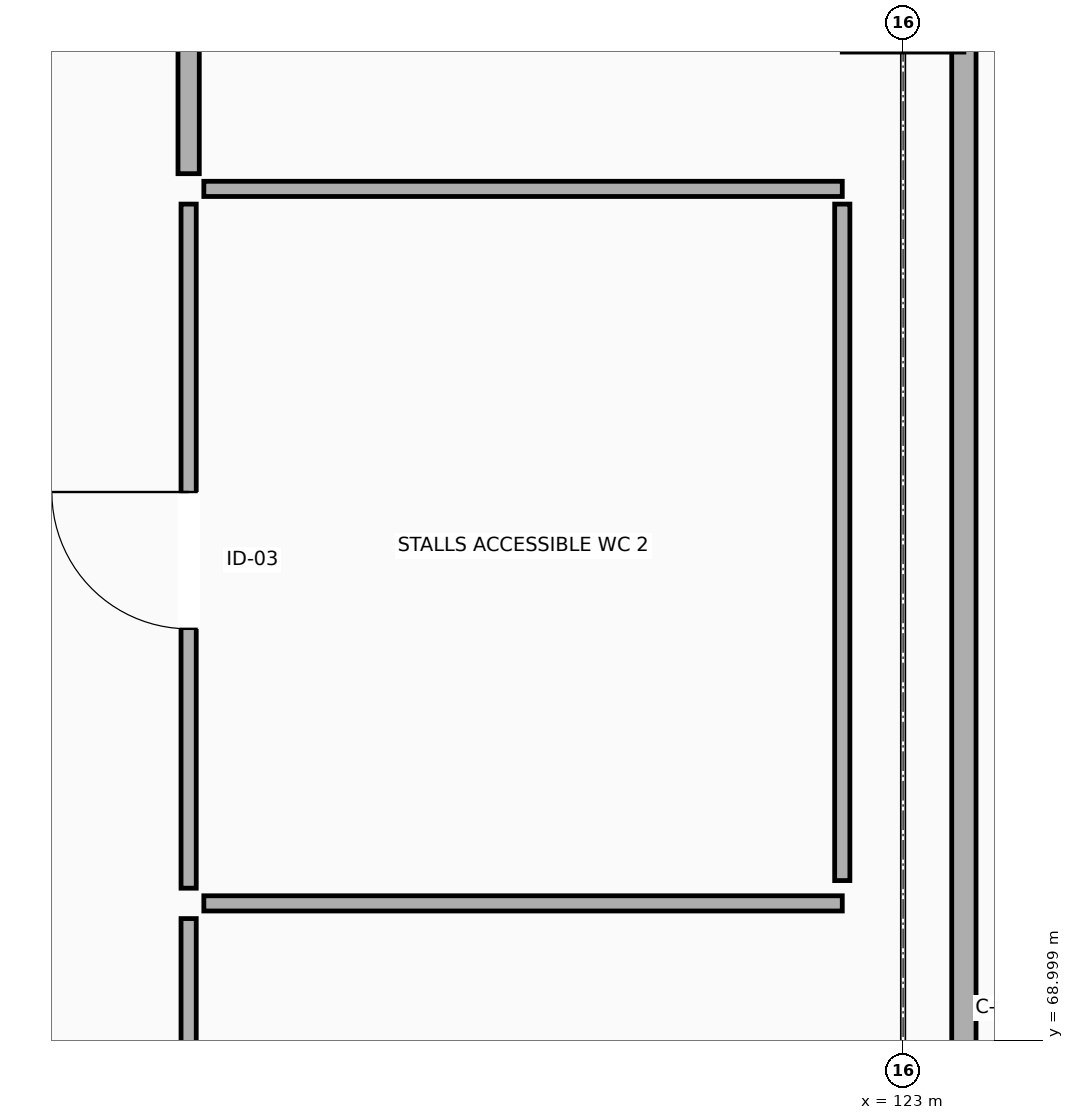
"""IFC4 building model, lengths in metres.
Left out: names, types, materials, properties, quantities, classifications, styles, units other than length and angle.
Written with IfcOpenShell. Run it as: python <this file> out.ifc"""

import sys

from ifc_helpers import new_model, si_unit, direction, frame, frame_2d, origin, origin_2d, place, context, subcontext, project, spatial, rectangle, extrude, element, fill, save


model = new_model("IFC4")
c1 = context("Model", 3, precision=1e-05, world=origin(), true_north=direction((0.0, 1.0)))
c2 = subcontext(c1, "Body", "Model", "MODEL_VIEW")
j1 = project(units=[si_unit("LENGTHUNIT", "METRE"), si_unit("PLANEANGLEUNIT", "RADIAN")], contexts=[c1])
p1 = place(None, origin())
s1 = spatial("IfcSite", under=j1, at=p1, CompositionType="ELEMENT")
p2 = place(p1, origin())
s2 = spatial("IfcBuilding", under=s1, at=p2, CompositionType="ELEMENT")
p3 = place(p2, origin())
s3 = spatial("IfcBuildingStorey", under=s2, at=p3, CompositionType="ELEMENT", Elevation=0.0)
p4 = place(p3, frame((123.0, 75.9, 0.0), z_axis=(0.0, 0.0, 1.0), x_axis=(1.0, 0.0, 0.0)))
e1 = element("IfcColumn", 1, at=p4, inside=s3, PredefinedType="COLUMN", context=c2, shape_type="SweptSolid", body=[
    extrude(rectangle(XDim=0.8, YDim=0.8, at=origin_2d()), origin(), (0.0, 0.0, 1.0), 5.4),
])
p5 = place(p3, frame((118.3, 65.3, 0.0), z_axis=(0.0, 0.0, 1.0), x_axis=(0.0, 1.0, 0.0)))
e2 = element("IfcWall", 2, at=p5, inside=s3, PredefinedType="PARTITIONING", context=c2, shape_type="SweptSolid", body=[
    extrude(rectangle(XDim=4.5, YDim=0.1, at=frame_2d((2.25, 0.0))), origin(), (0.0, 0.0, 1.0), 4.137),
])
p6 = place(p5, frame((0.58, 0.0, 0.0)))
e3 = element("IfcOpeningElement", 3, at=p6, cuts=e2, PredefinedType="OPENING", context=c2, shape_type="SweptSolid", body=[
    extrude(rectangle(XDim=0.9, YDim=2.1, at=frame_2d((0.45, 1.05))), frame((0.0, 0.06, 0.0), z_axis=(0.0, -1.0, 0.0), x_axis=(1.0, 0.0, 0.0)), (0.0, 0.0, 1.0), 0.12),
])
p7 = place(p3, frame((118.3, 70.0, 0.0), z_axis=(0.0, 0.0, 1.0), x_axis=(0.0, 1.0, 0.0)))
e4 = element("IfcWall", 4, at=p7, inside=s3, PredefinedType="PARTITIONING", context=c2, shape_type="SweptSolid", body=[
    extrude(rectangle(XDim=4.5, YDim=0.1, at=frame_2d((2.25, 0.0))), origin(), (0.0, 0.0, 1.0), 5.085),
])
p8 = place(p7, frame((1.706, 0.0, 0.0)))
e5 = element("IfcOpeningElement", 5, at=p8, cuts=e4, PredefinedType="OPENING", context=c2, shape_type="SweptSolid", body=[
    extrude(rectangle(XDim=0.9, YDim=2.1, at=frame_2d((0.45, 1.05))), frame((0.0, 0.06, 0.0), z_axis=(0.0, -1.0, 0.0), x_axis=(1.0, 0.0, 0.0)), (0.0, 0.0, 1.0), 0.12),
])
p9 = place(p3, frame((118.3, 74.7, 0.0), z_axis=(0.0, 0.0, 1.0), x_axis=(0.0, 1.0, 0.0)))
e6 = element("IfcWall", 6, at=p9, inside=s3, PredefinedType="PARTITIONING", context=c2, shape_type="SweptSolid", body=[
    extrude(rectangle(XDim=4.3, YDim=0.14, at=frame_2d((2.15, 0.0))), origin(), (0.0, 0.0, 1.0), 4.137),
])
p10 = place(p9, frame((2.27, 0.0, 0.0)))
e7 = element("IfcOpeningElement", 7, at=p10, cuts=e6, PredefinedType="OPENING", context=c2, shape_type="SweptSolid", body=[
    extrude(rectangle(XDim=1.45, YDim=2.3, at=frame_2d((0.725, 1.15))), frame((0.0, 0.08, 0.0), z_axis=(0.0, -1.0, 0.0), x_axis=(1.0, 0.0, 0.0)), (0.0, 0.0, 1.0), 0.16),
])
for number, where, z_axis, x_axis in (
    (8, (118.4, 69.9, 0.0), (0.0, 0.0, 1.0), (1.0, 0.0, 0.0)),
    (9, (118.4, 74.6, 0.0), (0.0, 0.0, 1.0), (1.0, 0.0, 0.0)),
):
    element("IfcWall", number, at=place(p3, frame(where, z_axis=z_axis, x_axis=x_axis)), inside=s3, PredefinedType="PARTITIONING", context=c2, shape_type="SweptSolid", body=[
        extrude(rectangle(XDim=4.2, YDim=0.1, at=frame_2d((2.1, 0.0))), origin(), (0.0, 0.0, 1.0), 4.727),
    ])
p11 = place(p3, frame((122.6, 70.05, 0.0), z_axis=(0.0, 0.0, 1.0), x_axis=(0.0, 1.0, 0.0)))
e10 = element("IfcWall", 10, at=p11, inside=s3, PredefinedType="PARTITIONING", context=c2, shape_type="SweptSolid", body=[
    extrude(rectangle(XDim=4.45, YDim=0.1, at=frame_2d((2.225, 0.0))), origin(), (0.0, 0.0, 1.0), 5.085),
])
p12 = place(p3, frame((123.4, 68.88, 0.0), z_axis=(0.0, 0.0, 1.0), x_axis=(0.0, 1.0, 0.0)))
e11 = element("IfcWall", 11, at=p12, inside=s3, PredefinedType="PARTITIONING", context=c2, shape_type="SweptSolid", body=[
    extrude(rectangle(XDim=13.92, YDim=0.16, at=frame_2d((6.96, 0.0))), origin(), (0.0, 0.0, 1.0), 4.137),
])
p13 = place(p8, origin())
e12 = element("IfcDoor", 12, at=p13, inside=s3, OperationType="SINGLE_SWING_RIGHT", PredefinedType="DOOR", context=c2, shape_type="SweptSolid", body=[
    extrude(rectangle(XDim=0.9, YDim=2.1, at=frame_2d((0.45, 1.05))), frame((0.0, 0.025, 0.0), z_axis=(0.0, -1.0, 0.0), x_axis=(1.0, 0.0, 0.0)), (0.0, 0.0, 1.0), 0.05),
])
fill(e5, e12)
save(model, sys.argv[1])
